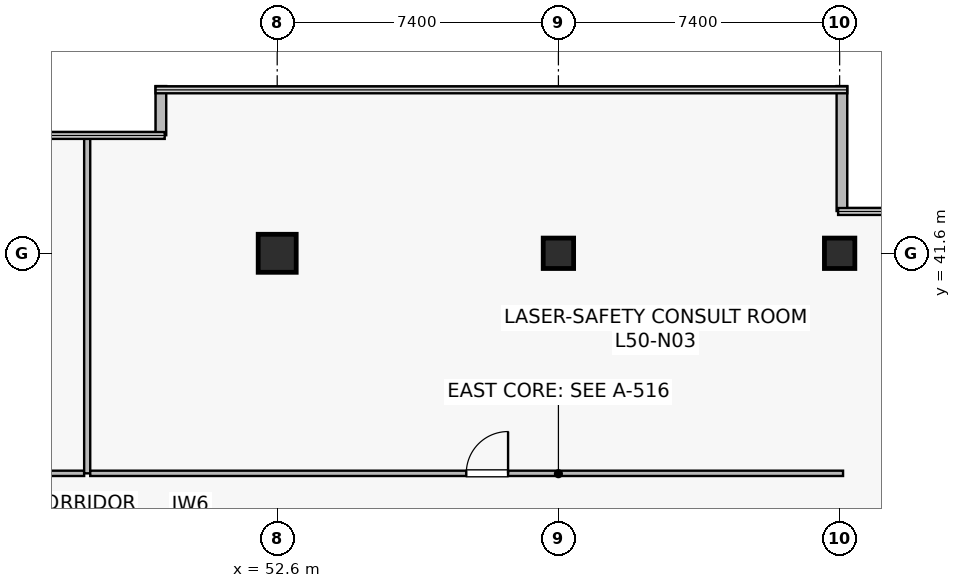
"""IFC4 building model, lengths in metres.
Left out: names, types, materials, properties, quantities, classifications, styles, units other than length and angle.
Written with IfcOpenShell. Run it as: python <this file> out.ifc"""

import sys

from ifc_helpers import new_model, si_unit, direction, frame, frame_2d, origin, origin_2d, place, context, subcontext, project, spatial, rectangle, extrude, source, transform, mapped, element, fill, save


model = new_model("IFC4")
c1 = context("Model", 3, precision=1e-05, world=origin(), true_north=direction((0.0, 1.0)))
c2 = subcontext(c1, "Body", "Model", "MODEL_VIEW")
j1 = project(units=[si_unit("LENGTHUNIT", "METRE"), si_unit("PLANEANGLEUNIT", "RADIAN")], contexts=[c1])
p1 = place(None, origin())
s1 = spatial("IfcSite", under=j1, at=p1, CompositionType="ELEMENT")
p2 = place(p1, origin())
s2 = spatial("IfcBuilding", under=s1, at=p2, CompositionType="ELEMENT")
p3 = place(p2, frame((0.0, 0.0, 209.6)))
s3 = spatial("IfcBuildingStorey", under=s2, at=p3, CompositionType="ELEMENT", Elevation=209.6)
m1 = source(origin(), c2, "Body", "SweptSolid", [
    extrude(rectangle(XDim=1.0, YDim=1.0, at=origin_2d()), origin(), (0.0, 0.0, 1.0), 4.1),
])
p4 = place(p3, frame((52.6, 41.6, 0.0), z_axis=(0.0, 0.0, 1.0), x_axis=(1.0, 0.0, 0.0)))
e1 = element("IfcColumn", 1, at=p4, inside=s3, PredefinedType="COLUMN", context=c2, shape_type="MappedRepresentation", body=[
    mapped(m1, transform((0.0, 0.0, 0.0), scale=1.0)),
])
m2 = source(origin(), c2, "Body", "SweptSolid", [
    extrude(rectangle(XDim=0.8, YDim=0.8, at=origin_2d()), origin(), (0.0, 0.0, 1.0), 4.1),
])
for number, where, z_axis, x_axis in (
    (2, (60.0, 41.6, 0.0), (0.0, 0.0, 1.0), (1.0, 0.0, 0.0)),
    (3, (67.4, 41.6, 0.0), (0.0, 0.0, 1.0), (1.0, 0.0, 0.0)),
):
    element("IfcColumn", number, at=place(p3, frame(where, z_axis=z_axis, x_axis=x_axis)), inside=s3, PredefinedType="COLUMN", context=c2, shape_type="MappedRepresentation", body=[
        mapped(m2, transform((0.0, 0.0, 0.0), scale=1.0)),
    ])
p5 = place(p3, frame((67.46, 42.712, 0.0), z_axis=(0.0, 0.0, 1.0), x_axis=(0.0, 1.0, 0.0)))
e4 = element("IfcWall", 4, at=p5, inside=s3, PredefinedType="STANDARD", context=c2, shape_type="SweptSolid", body=[
    extrude(rectangle(XDim=3.288, YDim=0.28, at=frame_2d((1.644, 0.0))), origin(), (0.0, 0.0, 1.0), 3.8),
])
p6 = place(p3, frame((49.54, 46.0, 0.0), z_axis=(0.0, 0.0, 1.0), x_axis=(0.0, -1.0, 0.0)))
e5 = element("IfcWall", 5, at=p6, inside=s3, PredefinedType="STANDARD", context=c2, shape_type="SweptSolid", body=[
    extrude(rectangle(XDim=1.293, YDim=0.28, at=frame_2d((0.646, 0.0))), origin(), (0.0, 0.0, 1.0), 3.8),
])
p7 = place(p3, frame((23.88, 35.81, 0.0), z_axis=(0.0, 0.0, 1.0), x_axis=(1.0, 0.0, 0.0)))
e6 = element("IfcWall", 6, at=p7, inside=s3, PredefinedType="PARTITIONING", context=c2, shape_type="SweptSolid", body=[
    extrude(rectangle(XDim=23.64, YDim=0.14, at=frame_2d((11.82, 0.0))), origin(), (0.0, 0.0, 1.0), 3.197),
])
p8 = place(p7, frame((9.304, 0.0, 0.0)))
e7 = element("IfcOpeningElement", 7, at=p8, cuts=e6, PredefinedType="OPENING", context=c2, shape_type="SweptSolid", body=[
    extrude(rectangle(XDim=1.1, YDim=2.18, at=frame_2d((0.55, 1.09))), frame((0.0, 0.08, 0.0), z_axis=(0.0, -1.0, 0.0), x_axis=(1.0, 0.0, 0.0)), (0.0, 0.0, 1.0), 0.16),
])
p9 = place(p3, frame((47.6, 35.81, 0.0), z_axis=(0.0, 0.0, 1.0), x_axis=(0.0, 1.0, 0.0)))
e8 = element("IfcWall", 8, at=p9, inside=s3, PredefinedType="PARTITIONING", context=c2, shape_type="SweptSolid", body=[
    extrude(rectangle(XDim=8.88, YDim=0.16, at=frame_2d((4.44, 0.0))), origin(), (0.0, 0.0, 1.0), 3.135),
])
p10 = place(p3, frame((47.68, 35.81, 0.0), z_axis=(0.0, 0.0, 1.0), x_axis=(1.0, 0.0, 0.0)))
e9 = element("IfcWall", 9, at=p10, inside=s3, PredefinedType="PARTITIONING", context=c2, shape_type="SweptSolid", body=[
    extrude(rectangle(XDim=19.81, YDim=0.14, at=frame_2d((9.905, 0.0))), origin(), (0.0, 0.0, 1.0), 3.197),
])
p11 = place(p10, frame((9.895, 0.0, 0.0)))
e10 = element("IfcOpeningElement", 10, at=p11, cuts=e9, PredefinedType="OPENING", context=c2, shape_type="SweptSolid", body=[
    extrude(rectangle(XDim=1.1, YDim=2.18, at=frame_2d((0.55, 1.09))), frame((0.0, 0.08, 0.0), z_axis=(0.0, -1.0, 0.0), x_axis=(1.0, 0.0, 0.0)), (0.0, 0.0, 1.0), 0.16),
])
m3 = source(origin(), c2, "Body", "SweptSolid", [
    extrude(rectangle(XDim=1.1, YDim=2.18, at=frame_2d((0.55, 1.09))), frame((0.0, 0.025, 0.0), z_axis=(0.0, -1.0, 0.0), x_axis=(1.0, 0.0, 0.0)), (0.0, 0.0, 1.0), 0.05),
])
p12 = place(p11, origin())
e11 = element("IfcDoor", 11, at=p12, inside=s3, OperationType="SINGLE_SWING_RIGHT", PredefinedType="DOOR", context=c2, shape_type="MappedRepresentation", body=[
    mapped(m3, transform((0.0, 0.0, 0.0), scale=1.0)),
])
fill(e10, e11)
save(model, sys.argv[1])
